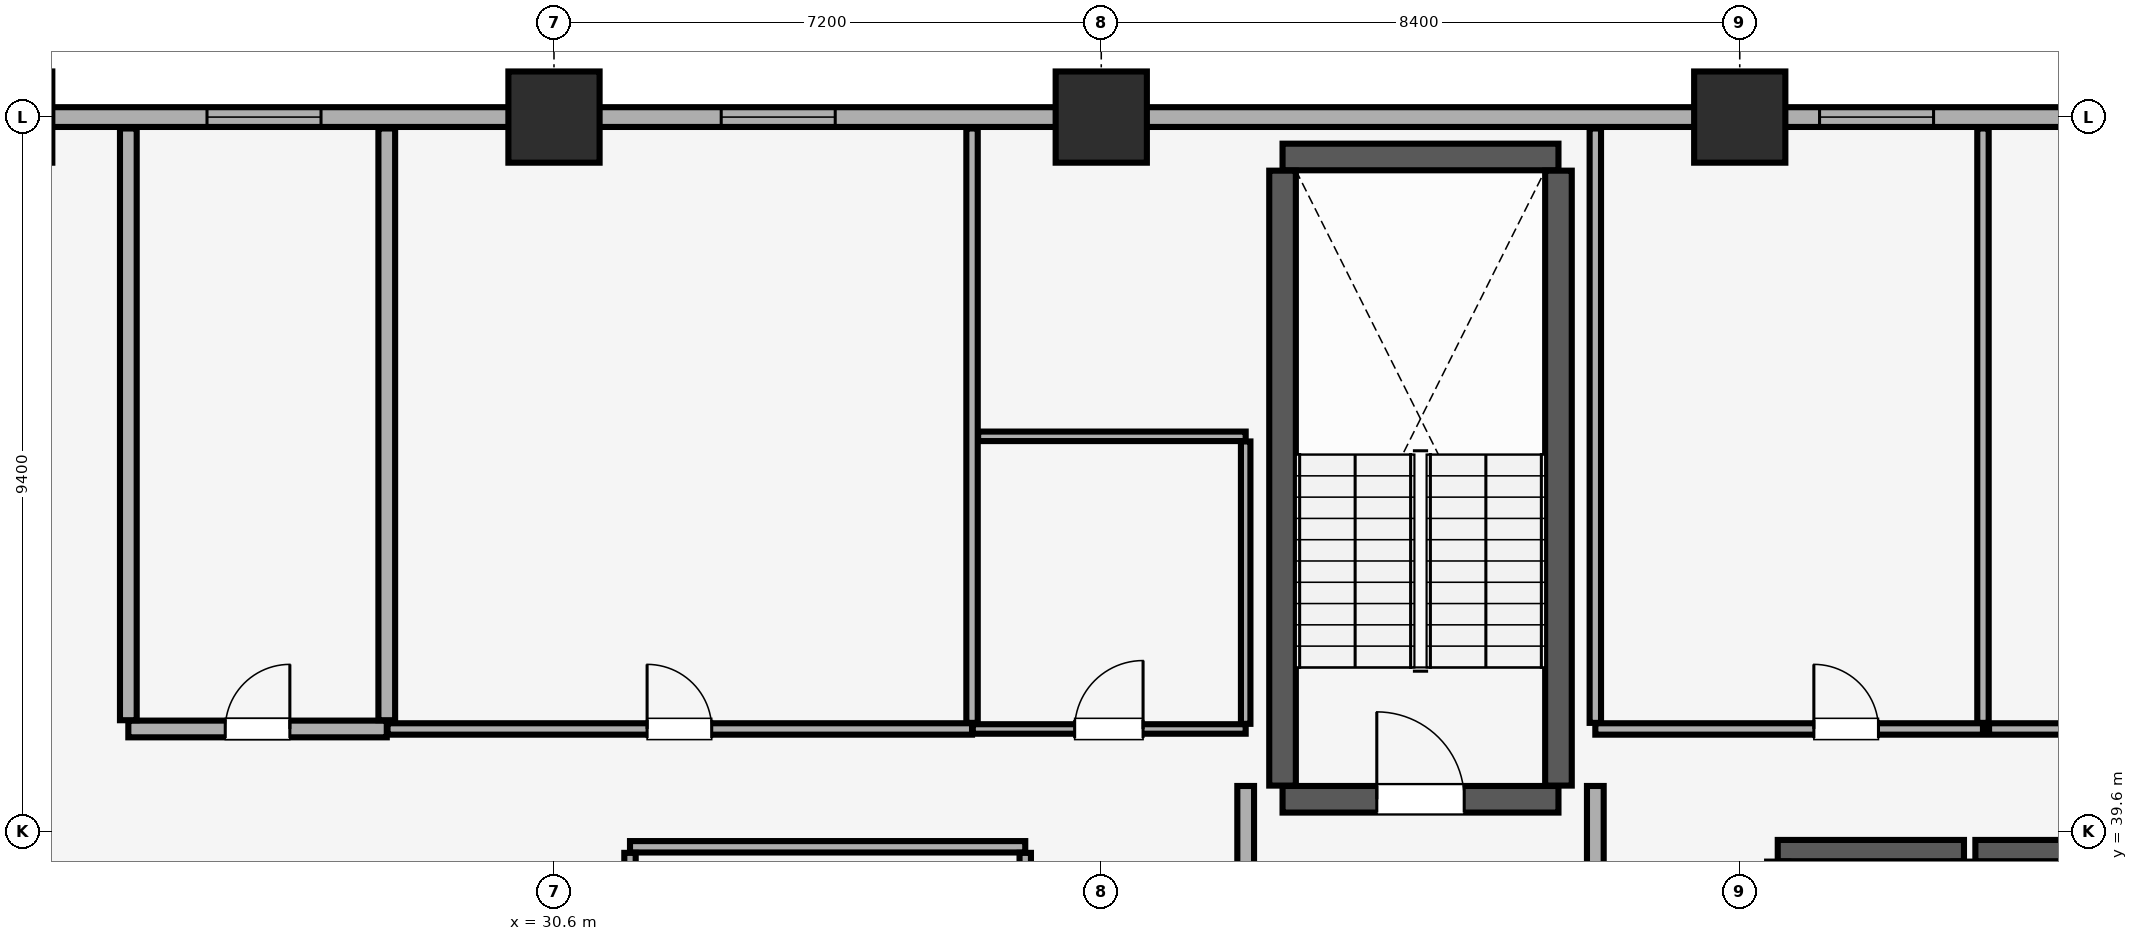
"""IFC4 building model, lengths in metres.
Left out: names, types, materials, properties, quantities, classifications, styles, units other than length and angle.
Written with IfcOpenShell. Run it as: python <this file> out.ifc"""

import sys

from ifc_helpers import new_model, si_unit, direction, frame, frame_2d, origin, origin_2d, place, context, subcontext, project, spatial, rectangle, extrude, element, fill, save


model = new_model("IFC4")
c1 = context("Model", 3, precision=1e-05, world=origin(), true_north=direction((0.0, 1.0)))
c2 = subcontext(c1, "Body", "Model", "MODEL_VIEW")
j1 = project(units=[si_unit("LENGTHUNIT", "METRE"), si_unit("PLANEANGLEUNIT", "RADIAN")], contexts=[c1])
p1 = place(None, origin())
s1 = spatial("IfcSite", under=j1, at=p1, CompositionType="ELEMENT")
p2 = place(p1, origin())
s2 = spatial("IfcBuilding", under=s1, at=p2, CompositionType="ELEMENT")
p3 = place(p2, frame((0.0, 0.0, 126.8)))
s3 = spatial("IfcBuildingStorey", under=s2, at=p3, CompositionType="ELEMENT", Elevation=126.8)
for number, where, z_axis, x_axis in (
    (1, (30.6, 49.0, 0.0), (0.0, 0.0, 1.0), (1.0, 0.0, 0.0)),
    (2, (37.8, 49.0, 0.0), (0.0, 0.0, 1.0), (1.0, 0.0, 0.0)),
    (3, (46.2, 49.0, 0.0), (0.0, 0.0, 1.0), (1.0, 0.0, 0.0)),
):
    element("IfcColumn", number, at=place(p3, frame(where, z_axis=z_axis, x_axis=x_axis)), inside=s3, PredefinedType="COLUMN", context=c2, shape_type="SweptSolid", body=[
        extrude(rectangle(XDim=1.2, YDim=1.2, at=origin_2d()), origin(), (0.0, 0.0, 1.0), 3.51),
    ])
p4 = place(p3, frame((79.8, 49.0, 0.0), z_axis=(0.0, 0.0, 1.0), x_axis=(-1.0, 0.0, 0.0)))
e4 = element("IfcWall", 4, at=p4, inside=s3, PredefinedType="SOLIDWALL", context=c2, shape_type="SweptSolid", body=[
    extrude(rectangle(XDim=75.6, YDim=0.26, at=frame_2d((37.8, 0.0))), origin(), (0.0, 0.0, 1.0), 2.56),
])
p5 = place(p4, frame((72.565, 0.0, 0.85)))
e5 = element("IfcOpeningElement", 5, at=p5, cuts=e4, PredefinedType="OPENING", context=c2, shape_type="SweptSolid", body=[
    extrude(rectangle(XDim=1.5, YDim=1.4, at=frame_2d((0.75, 0.7))), frame((0.0, 0.14, 0.0), z_axis=(0.0, -1.0, 0.0), x_axis=(1.0, 0.0, 0.0)), (0.0, 0.0, 1.0), 0.28),
])
p6 = place(p4, frame((67.45, 0.0, 0.85)))
e6 = element("IfcOpeningElement", 6, at=p6, cuts=e4, PredefinedType="OPENING", context=c2, shape_type="SweptSolid", body=[
    extrude(rectangle(XDim=1.5, YDim=1.4, at=frame_2d((0.75, 0.7))), frame((0.0, 0.14, 0.0), z_axis=(0.0, -1.0, 0.0), x_axis=(1.0, 0.0, 0.0)), (0.0, 0.0, 1.0), 0.28),
])
p7 = place(p4, frame((7.6, 0.0, 0.85)))
e7 = element("IfcOpeningElement", 7, at=p7, cuts=e4, PredefinedType="OPENING", context=c2, shape_type="SweptSolid", body=[
    extrude(rectangle(XDim=1.5, YDim=1.4, at=frame_2d((0.75, 0.7))), frame((0.0, 0.14, 0.0), z_axis=(0.0, -1.0, 0.0), x_axis=(1.0, 0.0, 0.0)), (0.0, 0.0, 1.0), 0.28),
])
p8 = place(p4, frame((1.535, 0.0, 0.85)))
e8 = element("IfcOpeningElement", 8, at=p8, cuts=e4, PredefinedType="OPENING", context=c2, shape_type="SweptSolid", body=[
    extrude(rectangle(XDim=1.5, YDim=1.4, at=frame_2d((0.75, 0.7))), frame((0.0, 0.14, 0.0), z_axis=(0.0, -1.0, 0.0), x_axis=(1.0, 0.0, 0.0)), (0.0, 0.0, 1.0), 0.28),
])
p9 = place(p4, frame((52.265, 0.0, 0.9)))
e9 = element("IfcOpeningElement", 9, at=p9, cuts=e4, PredefinedType="OPENING", context=c2, shape_type="SweptSolid", body=[
    extrude(rectangle(XDim=1.5, YDim=1.4, at=frame_2d((0.75, 0.7))), frame((0.0, 0.14, 0.0), z_axis=(0.0, -1.0, 0.0), x_axis=(1.0, 0.0, 0.0)), (0.0, 0.0, 1.0), 0.28),
])
p10 = place(p4, frame((45.5, 0.0, 0.9)))
e10 = element("IfcOpeningElement", 10, at=p10, cuts=e4, PredefinedType="OPENING", context=c2, shape_type="SweptSolid", body=[
    extrude(rectangle(XDim=1.5, YDim=1.4, at=frame_2d((0.75, 0.7))), frame((0.0, 0.14, 0.0), z_axis=(0.0, -1.0, 0.0), x_axis=(1.0, 0.0, 0.0)), (0.0, 0.0, 1.0), 0.28),
])
p11 = place(p4, frame((31.05, 0.0, 0.9)))
e11 = element("IfcOpeningElement", 11, at=p11, cuts=e4, PredefinedType="OPENING", context=c2, shape_type="SweptSolid", body=[
    extrude(rectangle(XDim=1.5, YDim=1.4, at=frame_2d((0.75, 0.7))), frame((0.0, 0.14, 0.0), z_axis=(0.0, -1.0, 0.0), x_axis=(1.0, 0.0, 0.0)), (0.0, 0.0, 1.0), 0.28),
])
p12 = place(p4, frame((27.85, 0.0, 0.9)))
e12 = element("IfcOpeningElement", 12, at=p12, cuts=e4, PredefinedType="OPENING", context=c2, shape_type="SweptSolid", body=[
    extrude(rectangle(XDim=1.5, YDim=1.4, at=frame_2d((0.75, 0.7))), frame((0.0, 0.14, 0.0), z_axis=(0.0, -1.0, 0.0), x_axis=(1.0, 0.0, 0.0)), (0.0, 0.0, 1.0), 0.28),
])
p13 = place(p4, frame((23.485, 0.0, 0.9)))
e13 = element("IfcOpeningElement", 13, at=p13, cuts=e4, PredefinedType="OPENING", context=c2, shape_type="SweptSolid", body=[
    extrude(rectangle(XDim=1.5, YDim=1.4, at=frame_2d((0.75, 0.7))), frame((0.0, 0.14, 0.0), z_axis=(0.0, -1.0, 0.0), x_axis=(1.0, 0.0, 0.0)), (0.0, 0.0, 1.0), 0.28),
])
p14 = place(p3, frame((40.185, 40.025, 0.0), z_axis=(0.0, 0.0, 1.0), x_axis=(1.0, 0.0, 0.0)))
e14 = element("IfcWall", 14, at=p14, inside=s3, PredefinedType="SHEAR", context=c2, shape_type="SweptSolid", body=[
    extrude(rectangle(XDim=3.63, YDim=0.35, at=frame_2d((1.815, 0.0))), origin(), (0.0, 0.0, 1.0), 3.51),
])
p15 = place(p14, frame((1.24, 0.0, 0.0)))
e15 = element("IfcOpeningElement", 15, at=p15, cuts=e14, PredefinedType="OPENING", context=c2, shape_type="SweptSolid", body=[
    extrude(rectangle(XDim=1.15, YDim=2.15, at=frame_2d((0.575, 1.075))), frame((0.0, 0.185, 0.0), z_axis=(0.0, -1.0, 0.0), x_axis=(1.0, 0.0, 0.0)), (0.0, 0.0, 1.0), 0.37),
])
p16 = place(p3, frame((40.185, 48.475, 0.0), z_axis=(0.0, 0.0, 1.0), x_axis=(1.0, 0.0, 0.0)))
e16 = element("IfcWall", 16, at=p16, inside=s3, PredefinedType="SHEAR", context=c2, shape_type="SweptSolid", body=[
    extrude(rectangle(XDim=3.63, YDim=0.35, at=frame_2d((1.815, 0.0))), origin(), (0.0, 0.0, 1.0), 3.51),
])
for number, where, z_axis, x_axis in (
    (17, (40.185, 40.205, 0.0), (0.0, 0.0, 1.0), (0.0, 1.0, 0.0)),
    (18, (43.815, 40.205, 0.0), (0.0, 0.0, 1.0), (0.0, 1.0, 0.0)),
):
    element("IfcWall", number, at=place(p3, frame(where, z_axis=z_axis, x_axis=x_axis)), inside=s3, PredefinedType="SHEAR", context=c2, shape_type="SweptSolid", body=[
        extrude(rectangle(XDim=8.09, YDim=0.35, at=frame_2d((4.045, 0.0))), origin(), (0.0, 0.0, 1.0), 3.51),
    ])
p17 = place(p3, frame((46.7, 39.35, 0.0), z_axis=(0.0, 0.0, 1.0), x_axis=(1.0, 0.0, 0.0)))
e19 = element("IfcWall", 19, at=p17, inside=s3, PredefinedType="SHEAR", context=c2, shape_type="SweptSolid", body=[
    extrude(rectangle(XDim=2.45, YDim=0.28, at=frame_2d((1.225, 0.0))), origin(), (0.0, 0.0, 1.0), 3.51),
])
for number, where, z_axis, x_axis in (
    (20, (46.7, 37.145, 0.0), (0.0, 0.0, 1.0), (0.0, 1.0, 0.0)),
    (21, (49.15, 37.145, 0.0), (0.0, 0.0, 1.0), (0.0, 1.0, 0.0)),
):
    element("IfcWall", number, at=place(p3, frame(where, z_axis=z_axis, x_axis=x_axis)), inside=s3, PredefinedType="SHEAR", context=c2, shape_type="SweptSolid", body=[
        extrude(rectangle(XDim=2.06, YDim=0.28, at=frame_2d((1.03, 0.0))), origin(), (0.0, 0.0, 1.0), 3.51),
    ])
p18 = place(p3, frame((49.3, 39.35, 0.0), z_axis=(0.0, 0.0, 1.0), x_axis=(1.0, 0.0, 0.0)))
e22 = element("IfcWall", 22, at=p18, inside=s3, PredefinedType="SHEAR", context=c2, shape_type="SweptSolid", body=[
    extrude(rectangle(XDim=2.45, YDim=0.28, at=frame_2d((1.225, 0.0))), origin(), (0.0, 0.0, 1.0), 3.51),
])
for number, where, z_axis, x_axis in (
    (23, (39.7, 34.415, 0.0), (0.0, 0.0, 1.0), (0.0, 1.0, 0.0)),
    (24, (44.3, 34.415, 0.0), (0.0, 0.0, 1.0), (0.0, 1.0, 0.0)),
):
    element("IfcWall", number, at=place(p3, frame(where, z_axis=z_axis, x_axis=x_axis)), inside=s3, PredefinedType="PARTITIONING", context=c2, shape_type="SweptSolid", body=[
        extrude(rectangle(XDim=5.785, YDim=0.22, at=frame_2d((2.893, 0.0))), origin(), (0.0, 0.0, 1.0), 3.51),
    ])
p19 = place(p3, frame((31.6, 39.4, 0.0), z_axis=(0.0, 0.0, 1.0), x_axis=(1.0, 0.0, 0.0)))
e25 = element("IfcWall", 25, at=p19, inside=s3, PredefinedType="PARTITIONING", context=c2, shape_type="SweptSolid", body=[
    extrude(rectangle(XDim=5.2, YDim=0.15, at=frame_2d((2.6, 0.0))), origin(), (0.0, 0.0, 1.0), 3.51),
])
for number, where, z_axis, x_axis in (
    (26, (31.6, 34.38, 0.0), (0.0, 0.0, 1.0), (0.0, 1.0, 0.0)),
    (27, (36.8, 34.38, 0.0), (0.0, 0.0, 1.0), (0.0, 1.0, 0.0)),
):
    element("IfcWall", number, at=place(p3, frame(where, z_axis=z_axis, x_axis=x_axis)), inside=s3, PredefinedType="PARTITIONING", context=c2, shape_type="SweptSolid", body=[
        extrude(rectangle(XDim=4.94, YDim=0.15, at=frame_2d((2.47, 0.0))), origin(), (0.0, 0.0, 1.0), 3.51),
    ])
p20 = place(p3, frame((25.0, 40.95, 0.0), z_axis=(0.0, 0.0, 1.0), x_axis=(1.0, 0.0, 0.0)))
e28 = element("IfcWall", 28, at=p20, inside=s3, PredefinedType="PARTITIONING", context=c2, shape_type="SweptSolid", body=[
    extrude(rectangle(XDim=3.4, YDim=0.22, at=frame_2d((1.7, 0.0))), origin(), (0.0, 0.0, 1.0), 3.51),
])
p21 = place(p20, frame((1.275, 0.0, 0.0)))
e29 = element("IfcOpeningElement", 29, at=p21, cuts=e28, PredefinedType="OPENING", context=c2, shape_type="SweptSolid", body=[
    extrude(rectangle(XDim=0.85, YDim=2.1, at=frame_2d((0.425, 1.05))), frame((0.0, 0.12, 0.0), z_axis=(0.0, -1.0, 0.0), x_axis=(1.0, 0.0, 0.0)), (0.0, 0.0, 1.0), 0.24),
])
for number, where, z_axis, x_axis in (
    (30, (25.0, 41.065, 0.0), (0.0, 0.0, 1.0), (0.0, 1.0, 0.0)),
    (31, (28.4, 41.065, 0.0), (0.0, 0.0, 1.0), (0.0, 1.0, 0.0)),
):
    element("IfcWall", number, at=place(p3, frame(where, z_axis=z_axis, x_axis=x_axis)), inside=s3, PredefinedType="PARTITIONING", context=c2, shape_type="SweptSolid", body=[
        extrude(rectangle(XDim=7.785, YDim=0.22, at=frame_2d((3.893, 0.0))), origin(), (0.0, 0.0, 1.0), 3.51),
    ])
p22 = place(p3, frame((28.41, 40.95, 0.0), z_axis=(0.0, 0.0, 1.0), x_axis=(1.0, 0.0, 0.0)))
e32 = element("IfcWall", 32, at=p22, inside=s3, PredefinedType="PARTITIONING", context=c2, shape_type="SweptSolid", body=[
    extrude(rectangle(XDim=7.69, YDim=0.15, at=frame_2d((3.845, 0.0))), origin(), (0.0, 0.0, 1.0), 3.51),
])
p23 = place(p22, frame((3.415, 0.0, 0.0)))
e33 = element("IfcOpeningElement", 33, at=p23, cuts=e32, PredefinedType="OPENING", context=c2, shape_type="SweptSolid", body=[
    extrude(rectangle(XDim=0.85, YDim=2.1, at=frame_2d((0.425, 1.05))), frame((0.0, 0.085, 0.0), z_axis=(0.0, -1.0, 0.0), x_axis=(1.0, 0.0, 0.0)), (0.0, 0.0, 1.0), 0.17),
])
p24 = place(p3, frame((36.1, 41.03, 0.0), z_axis=(0.0, 0.0, 1.0), x_axis=(0.0, 1.0, 0.0)))
e34 = element("IfcWall", 34, at=p24, inside=s3, PredefinedType="PARTITIONING", context=c2, shape_type="SweptSolid", body=[
    extrude(rectangle(XDim=7.82, YDim=0.15, at=frame_2d((3.91, 0.0))), origin(), (0.0, 0.0, 1.0), 3.51),
])
p25 = place(p3, frame((36.11, 40.95, 0.0), z_axis=(0.0, 0.0, 1.0), x_axis=(1.0, 0.0, 0.0)))
e35 = element("IfcWall", 35, at=p25, inside=s3, PredefinedType="PARTITIONING", context=c2, shape_type="SweptSolid", body=[
    extrude(rectangle(XDim=3.59, YDim=0.125, at=frame_2d((1.795, 0.0))), origin(), (0.0, 0.0, 1.0), 3.51),
])
p26 = place(p25, frame((1.34, 0.0, 0.0)))
e36 = element("IfcOpeningElement", 36, at=p26, cuts=e35, PredefinedType="OPENING", context=c2, shape_type="SweptSolid", body=[
    extrude(rectangle(XDim=0.9, YDim=2.1, at=frame_2d((0.45, 1.05))), frame((0.0, 0.073, 0.0), z_axis=(0.0, -1.0, 0.0), x_axis=(1.0, 0.0, 0.0)), (0.0, 0.0, 1.0), 0.145),
])
p27 = place(p3, frame((36.18, 44.8, 0.0), z_axis=(0.0, 0.0, 1.0), x_axis=(1.0, 0.0, 0.0)))
e37 = element("IfcWall", 37, at=p27, inside=s3, PredefinedType="PARTITIONING", context=c2, shape_type="SweptSolid", body=[
    extrude(rectangle(XDim=3.52, YDim=0.125, at=frame_2d((1.76, 0.0))), origin(), (0.0, 0.0, 1.0), 3.51),
])
p28 = place(p3, frame((39.7, 41.018, 0.0), z_axis=(0.0, 0.0, 1.0), x_axis=(0.0, 1.0, 0.0)))
e38 = element("IfcWall", 38, at=p28, inside=s3, PredefinedType="PARTITIONING", context=c2, shape_type="SweptSolid", body=[
    extrude(rectangle(XDim=3.715, YDim=0.125, at=frame_2d((1.857, 0.0))), origin(), (0.0, 0.0, 1.0), 3.51),
])
p29 = place(p3, frame((44.3, 40.95, 0.0), z_axis=(0.0, 0.0, 1.0), x_axis=(1.0, 0.0, 0.0)))
e39 = element("IfcWall", 39, at=p29, inside=s3, PredefinedType="PARTITIONING", context=c2, shape_type="SweptSolid", body=[
    extrude(rectangle(XDim=5.1, YDim=0.15, at=frame_2d((2.55, 0.0))), origin(), (0.0, 0.0, 1.0), 3.51),
])
p30 = place(p29, frame((2.875, 0.0, 0.0)))
e40 = element("IfcOpeningElement", 40, at=p30, cuts=e39, PredefinedType="OPENING", context=c2, shape_type="SweptSolid", body=[
    extrude(rectangle(XDim=0.85, YDim=2.1, at=frame_2d((0.425, 1.05))), frame((0.0, 0.085, 0.0), z_axis=(0.0, -1.0, 0.0), x_axis=(1.0, 0.0, 0.0)), (0.0, 0.0, 1.0), 0.17),
])
for number, where, z_axis, x_axis in (
    (41, (44.3, 41.03, 0.0), (0.0, 0.0, 1.0), (0.0, 1.0, 0.0)),
    (42, (49.4, 41.03, 0.0), (0.0, 0.0, 1.0), (0.0, 1.0, 0.0)),
):
    element("IfcWall", number, at=place(p3, frame(where, z_axis=z_axis, x_axis=x_axis)), inside=s3, PredefinedType="PARTITIONING", context=c2, shape_type="SweptSolid", body=[
        extrude(rectangle(XDim=7.82, YDim=0.15, at=frame_2d((3.91, 0.0))), origin(), (0.0, 0.0, 1.0), 3.51),
    ])
p31 = place(p3, frame((49.48, 40.95, 0.0), z_axis=(0.0, 0.0, 1.0), x_axis=(1.0, 0.0, 0.0)))
e43 = element("IfcWall", 43, at=p31, inside=s3, PredefinedType="PARTITIONING", context=c2, shape_type="SweptSolid", body=[
    extrude(rectangle(XDim=8.02, YDim=0.15, at=frame_2d((4.01, 0.0))), origin(), (0.0, 0.0, 1.0), 3.51),
])
p32 = place(p31, frame((4.72, 0.0, 0.0)))
e44 = element("IfcOpeningElement", 44, at=p32, cuts=e43, PredefinedType="OPENING", context=c2, shape_type="SweptSolid", body=[
    extrude(rectangle(XDim=1.0, YDim=2.15, at=frame_2d((0.5, 1.075))), frame((0.0, 0.085, 0.0), z_axis=(0.0, -1.0, 0.0), x_axis=(1.0, 0.0, 0.0)), (0.0, 0.0, 1.0), 0.17),
])
p33 = place(p9, origin())
e45 = element("IfcWindow", 45, at=p33, inside=s3, PartitioningType="SINGLE_PANEL", PredefinedType="WINDOW", context=c2, shape_type="SweptSolid", body=[
    extrude(rectangle(XDim=1.5, YDim=1.4, at=frame_2d((0.75, 0.7))), frame((0.0, 0.03, 0.0), z_axis=(0.0, -1.0, 0.0), x_axis=(1.0, 0.0, 0.0)), (0.0, 0.0, 1.0), 0.06),
])
fill(e9, e45)
p34 = place(p10, origin())
e46 = element("IfcWindow", 46, at=p34, inside=s3, PartitioningType="SINGLE_PANEL", PredefinedType="WINDOW", context=c2, shape_type="SweptSolid", body=[
    extrude(rectangle(XDim=1.5, YDim=1.4, at=frame_2d((0.75, 0.7))), frame((0.0, 0.03, 0.0), z_axis=(0.0, -1.0, 0.0), x_axis=(1.0, 0.0, 0.0)), (0.0, 0.0, 1.0), 0.06),
])
fill(e10, e46)
p35 = place(p11, origin())
e47 = element("IfcWindow", 47, at=p35, inside=s3, PartitioningType="SINGLE_PANEL", PredefinedType="WINDOW", context=c2, shape_type="SweptSolid", body=[
    extrude(rectangle(XDim=1.5, YDim=1.4, at=frame_2d((0.75, 0.7))), frame((0.0, 0.03, 0.0), z_axis=(0.0, -1.0, 0.0), x_axis=(1.0, 0.0, 0.0)), (0.0, 0.0, 1.0), 0.06),
])
fill(e11, e47)
p36 = place(p15, origin())
e48 = element("IfcDoor", 48, at=p36, inside=s3, OperationType="SINGLE_SWING_LEFT", PredefinedType="DOOR", context=c2, shape_type="SweptSolid", body=[
    extrude(rectangle(XDim=1.15, YDim=2.15, at=frame_2d((0.575, 1.075))), frame((0.0, 0.025, 0.0), z_axis=(0.0, -1.0, 0.0), x_axis=(1.0, 0.0, 0.0)), (0.0, 0.0, 1.0), 0.05),
])
fill(e15, e48)
p37 = place(p21, origin())
e49 = element("IfcDoor", 49, at=p37, inside=s3, OperationType="SINGLE_SWING_RIGHT", PredefinedType="DOOR", context=c2, shape_type="SweptSolid", body=[
    extrude(rectangle(XDim=0.85, YDim=2.1, at=frame_2d((0.425, 1.05))), frame((0.0, 0.025, 0.0), z_axis=(0.0, -1.0, 0.0), x_axis=(1.0, 0.0, 0.0)), (0.0, 0.0, 1.0), 0.05),
])
fill(e29, e49)
p38 = place(p23, origin())
e50 = element("IfcDoor", 50, at=p38, inside=s3, OperationType="SINGLE_SWING_LEFT", PredefinedType="DOOR", context=c2, shape_type="SweptSolid", body=[
    extrude(rectangle(XDim=0.85, YDim=2.1, at=frame_2d((0.425, 1.05))), frame((0.0, 0.025, 0.0), z_axis=(0.0, -1.0, 0.0), x_axis=(1.0, 0.0, 0.0)), (0.0, 0.0, 1.0), 0.05),
])
fill(e33, e50)
p39 = place(p26, origin())
e51 = element("IfcDoor", 51, at=p39, inside=s3, OperationType="SINGLE_SWING_RIGHT", PredefinedType="DOOR", context=c2, shape_type="SweptSolid", body=[
    extrude(rectangle(XDim=0.9, YDim=2.1, at=frame_2d((0.45, 1.05))), frame((0.0, 0.025, 0.0), z_axis=(0.0, -1.0, 0.0), x_axis=(1.0, 0.0, 0.0)), (0.0, 0.0, 1.0), 0.05),
])
fill(e36, e51)
p40 = place(p30, origin())
e52 = element("IfcDoor", 52, at=p40, inside=s3, OperationType="SINGLE_SWING_LEFT", PredefinedType="DOOR", context=c2, shape_type="SweptSolid", body=[
    extrude(rectangle(XDim=0.85, YDim=2.1, at=frame_2d((0.425, 1.05))), frame((0.0, 0.025, 0.0), z_axis=(0.0, -1.0, 0.0), x_axis=(1.0, 0.0, 0.0)), (0.0, 0.0, 1.0), 0.05),
])
fill(e40, e52)
save(model, sys.argv[1])
